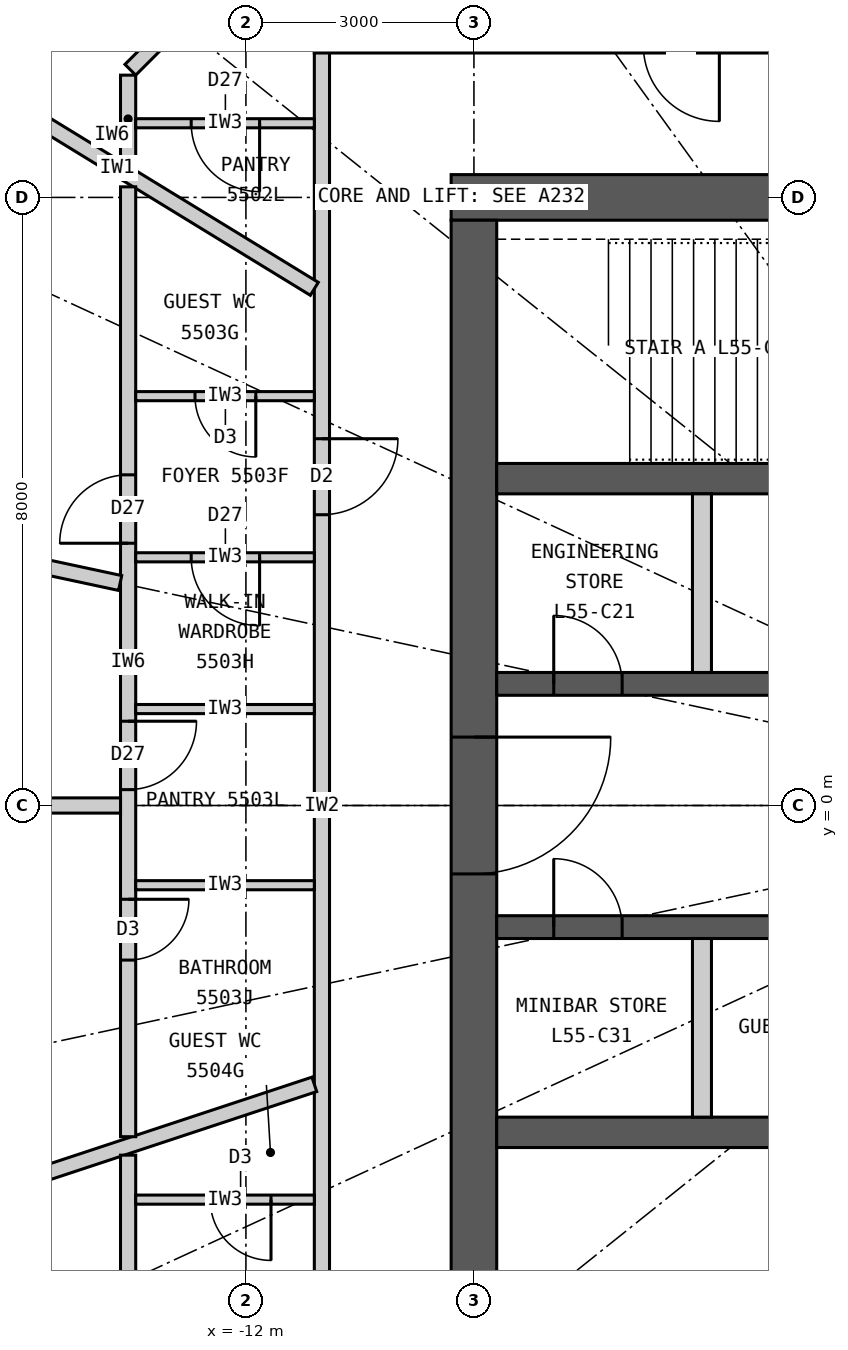
"""IFC4 building model, lengths in metres.
Left out: names, types, materials, properties, quantities, classifications, styles, units other than length and angle.
Written with IfcOpenShell. Run it as: python <this file> out.ifc"""

import sys

from ifc_helpers import new_model, si_unit, direction, frame, frame_2d, origin, place, context, subcontext, project, spatial, rectangle, extrude, element, fill, save


model = new_model("IFC4")
c1 = context("Model", 3, precision=1e-05, world=origin(), true_north=direction((0.0, 1.0)))
c2 = subcontext(c1, "Body", "Model", "MODEL_VIEW")
j1 = project(units=[si_unit("LENGTHUNIT", "METRE"), si_unit("PLANEANGLEUNIT", "RADIAN")], contexts=[c1])
p1 = place(None, origin())
s1 = spatial("IfcSite", under=j1, at=p1, CompositionType="ELEMENT")
p2 = place(p1, origin())
s2 = spatial("IfcBuilding", under=s1, at=p2, CompositionType="ELEMENT")
p3 = place(p2, frame((0.0, 0.0, 206.1)))
s3 = spatial("IfcBuildingStorey", under=s2, at=p3, CompositionType="ELEMENT", Elevation=206.1)
p4 = place(p3, frame((-9.3, 8.0, 0.0), z_axis=(0.0, 0.0, 1.0), x_axis=(1.0, 0.0, 0.0)))
e1 = element("IfcWall", 1, at=p4, inside=s3, PredefinedType="SHEAR", context=c2, shape_type="SweptSolid", body=[
    extrude(rectangle(XDim=18.6, YDim=0.6, at=frame_2d((9.3, 0.0))), origin(), (0.0, 0.0, 1.0), 3.3),
])
p5 = place(p4, frame((8.0, 0.0, 0.0)))
e2 = element("IfcOpeningElement", 2, at=p5, cuts=e1, PredefinedType="OPENING", context=c2, shape_type="SweptSolid", body=[
    extrude(rectangle(XDim=1.2, YDim=2.2, at=frame_2d((0.6, 1.1))), frame((0.0, 0.31, 0.0), z_axis=(0.0, -1.0, 0.0), x_axis=(1.0, 0.0, 0.0)), (0.0, 0.0, 1.0), 0.62),
])
p6 = place(p4, frame((15.6, 0.0, 0.0)))
e3 = element("IfcOpeningElement", 3, at=p6, cuts=e1, PredefinedType="OPENING", context=c2, shape_type="SweptSolid", body=[
    extrude(rectangle(XDim=0.9, YDim=2.2, at=frame_2d((0.45, 1.1))), frame((0.0, 0.31, 0.0), z_axis=(0.0, -1.0, 0.0), x_axis=(1.0, 0.0, 0.0)), (0.0, 0.0, 1.0), 0.62),
])
p7 = place(p3, frame((-9.0, 7.7, 0.0), z_axis=(0.0, 0.0, 1.0), x_axis=(0.0, -1.0, 0.0)))
e4 = element("IfcWall", 4, at=p7, inside=s3, PredefinedType="SHEAR", context=c2, shape_type="SweptSolid", body=[
    extrude(rectangle(XDim=15.4, YDim=0.6, at=frame_2d((7.7, 0.0))), origin(), (0.0, 0.0, 1.0), 3.3),
])
p8 = place(p7, frame((6.8, 0.0, 0.0)))
e5 = element("IfcOpeningElement", 5, at=p8, cuts=e4, PredefinedType="OPENING", context=c2, shape_type="SweptSolid", body=[
    extrude(rectangle(XDim=1.8, YDim=2.2, at=frame_2d((0.9, 1.1))), frame((0.0, 0.31, 0.0), z_axis=(0.0, -1.0, 0.0), x_axis=(1.0, 0.0, 0.0)), (0.0, 0.0, 1.0), 0.62),
])
p9 = place(p3, frame((-8.7, 4.3, 0.0), z_axis=(0.0, 0.0, 1.0), x_axis=(1.0, 0.0, 0.0)))
e6 = element("IfcWall", 6, at=p9, inside=s3, PredefinedType="SHEAR", context=c2, shape_type="SweptSolid", body=[
    extrude(rectangle(XDim=17.4, YDim=0.4, at=frame_2d((8.7, 0.0))), origin(), (0.0, 0.0, 1.0), 3.3),
])
p10 = place(p3, frame((-8.7, 1.6, 0.0), z_axis=(0.0, 0.0, 1.0), x_axis=(1.0, 0.0, 0.0)))
e7 = element("IfcWall", 7, at=p10, inside=s3, PredefinedType="SHEAR", context=c2, shape_type="SweptSolid", body=[
    extrude(rectangle(XDim=17.4, YDim=0.3, at=frame_2d((8.7, 0.0))), origin(), (0.0, 0.0, 1.0), 3.3),
])
p11 = place(p10, frame((12.65, 0.0, 0.0)))
e8 = element("IfcOpeningElement", 8, at=p11, cuts=e7, PredefinedType="OPENING", context=c2, shape_type="SweptSolid", body=[
    extrude(rectangle(XDim=1.1, YDim=2.2, at=frame_2d((0.55, 1.1))), frame((0.0, 0.16, 0.0), z_axis=(0.0, -1.0, 0.0), x_axis=(1.0, 0.0, 0.0)), (0.0, 0.0, 1.0), 0.32),
])
p12 = place(p10, frame((0.75, 0.0, 0.0)))
e9 = element("IfcOpeningElement", 9, at=p12, cuts=e7, PredefinedType="OPENING", context=c2, shape_type="SweptSolid", body=[
    extrude(rectangle(XDim=0.9, YDim=2.2, at=frame_2d((0.45, 1.1))), frame((0.0, 0.16, 0.0), z_axis=(0.0, -1.0, 0.0), x_axis=(1.0, 0.0, 0.0)), (0.0, 0.0, 1.0), 0.32),
])
p13 = place(p10, frame((6.75, 0.0, 0.0)))
e10 = element("IfcOpeningElement", 10, at=p13, cuts=e7, PredefinedType="OPENING", context=c2, shape_type="SweptSolid", body=[
    extrude(rectangle(XDim=0.9, YDim=2.2, at=frame_2d((0.45, 1.1))), frame((0.0, 0.16, 0.0), z_axis=(0.0, -1.0, 0.0), x_axis=(1.0, 0.0, 0.0)), (0.0, 0.0, 1.0), 0.32),
])
p14 = place(p3, frame((-8.7, -4.3, 0.0), z_axis=(0.0, 0.0, 1.0), x_axis=(1.0, 0.0, 0.0)))
e11 = element("IfcWall", 11, at=p14, inside=s3, PredefinedType="SHEAR", context=c2, shape_type="SweptSolid", body=[
    extrude(rectangle(XDim=17.4, YDim=0.4, at=frame_2d((8.7, 0.0))), origin(), (0.0, 0.0, 1.0), 3.3),
])
p15 = place(p3, frame((-8.7, -1.6, 0.0), z_axis=(0.0, 0.0, 1.0), x_axis=(1.0, 0.0, 0.0)))
e12 = element("IfcWall", 12, at=p15, inside=s3, PredefinedType="SHEAR", context=c2, shape_type="SweptSolid", body=[
    extrude(rectangle(XDim=17.4, YDim=0.3, at=frame_2d((8.7, 0.0))), origin(), (0.0, 0.0, 1.0), 3.3),
])
p16 = place(p15, frame((9.65, 0.0, 0.0)))
e13 = element("IfcOpeningElement", 13, at=p16, cuts=e12, PredefinedType="OPENING", context=c2, shape_type="SweptSolid", body=[
    extrude(rectangle(XDim=1.1, YDim=2.2, at=frame_2d((0.55, 1.1))), frame((0.0, 0.16, 0.0), z_axis=(0.0, -1.0, 0.0), x_axis=(1.0, 0.0, 0.0)), (0.0, 0.0, 1.0), 0.32),
])
p17 = place(p15, frame((12.4, 0.0, 0.0)))
e14 = element("IfcOpeningElement", 14, at=p17, cuts=e12, PredefinedType="OPENING", context=c2, shape_type="SweptSolid", body=[
    extrude(rectangle(XDim=1.6, YDim=2.4, at=frame_2d((0.8, 1.2))), frame((0.0, 0.16, 0.0), z_axis=(0.0, -1.0, 0.0), x_axis=(1.0, 0.0, 0.0)), (0.0, 0.0, 1.0), 0.32),
])
p18 = place(p15, frame((0.75, 0.0, 0.0)))
e15 = element("IfcOpeningElement", 15, at=p18, cuts=e12, PredefinedType="OPENING", context=c2, shape_type="SweptSolid", body=[
    extrude(rectangle(XDim=0.9, YDim=2.2, at=frame_2d((0.45, 1.1))), frame((0.0, 0.16, 0.0), z_axis=(0.0, -1.0, 0.0), x_axis=(1.0, 0.0, 0.0)), (0.0, 0.0, 1.0), 0.32),
])
p19 = place(p15, frame((5.25, 0.0, 0.0)))
e16 = element("IfcOpeningElement", 16, at=p19, cuts=e12, PredefinedType="OPENING", context=c2, shape_type="SweptSolid", body=[
    extrude(rectangle(XDim=0.9, YDim=2.2, at=frame_2d((0.45, 1.1))), frame((0.0, 0.16, 0.0), z_axis=(0.0, -1.0, 0.0), x_axis=(1.0, 0.0, 0.0)), (0.0, 0.0, 1.0), 0.32),
])
for number, where, z_axis, x_axis in (
    (17, (-6.0, 1.75, 0.0), (0.0, 0.0, 1.0), (0.0, 1.0, 0.0)),
    (18, (-6.0, -4.1, 0.0), (0.0, 0.0, 1.0), (0.0, 1.0, 0.0)),
):
    element("IfcWall", number, at=place(p3, frame(where, z_axis=z_axis, x_axis=x_axis)), inside=s3, PredefinedType="PARTITIONING", context=c2, shape_type="SweptSolid", body=[
        extrude(rectangle(XDim=2.35, YDim=0.25, at=frame_2d((1.175, 0.0))), origin(), (0.0, 0.0, 1.0), 3.3),
    ])
p20 = place(p3, frame((-11.1, 10.0, 0.0), z_axis=(0.0, 0.0, 1.0), x_axis=(1.0, 0.0, 0.0)))
e19 = element("IfcWall", 19, at=p20, inside=s3, PredefinedType="PARTITIONING", context=c2, shape_type="SweptSolid", body=[
    extrude(rectangle(XDim=22.2, YDim=0.2, at=frame_2d((11.1, 0.0))), origin(), (0.0, 0.0, 1.0), 3.12),
])
p21 = place(p20, frame((20.9, 0.0, 0.0)))
e20 = element("IfcOpeningElement", 20, at=p21, cuts=e19, PredefinedType="OPENING", context=c2, shape_type="SweptSolid", body=[
    extrude(rectangle(XDim=1.0, YDim=2.2, at=frame_2d((0.5, 1.1))), frame((0.0, 0.11, 0.0), z_axis=(0.0, -1.0, 0.0), x_axis=(1.0, 0.0, 0.0)), (0.0, 0.0, 1.0), 0.22),
])
p22 = place(p20, frame((4.329, 0.0, 0.0)))
e21 = element("IfcOpeningElement", 21, at=p22, cuts=e19, PredefinedType="OPENING", context=c2, shape_type="SweptSolid", body=[
    extrude(rectangle(XDim=1.0, YDim=2.2, at=frame_2d((0.5, 1.1))), frame((0.0, 0.11, 0.0), z_axis=(0.0, -1.0, 0.0), x_axis=(1.0, 0.0, 0.0)), (0.0, 0.0, 1.0), 0.22),
])
p23 = place(p3, frame((-11.0, 9.9, 0.0), z_axis=(0.0, 0.0, 1.0), x_axis=(0.0, -1.0, 0.0)))
e22 = element("IfcWall", 22, at=p23, inside=s3, PredefinedType="PARTITIONING", context=c2, shape_type="SweptSolid", body=[
    extrude(rectangle(XDim=19.8, YDim=0.2, at=frame_2d((9.9, 0.0))), origin(), (0.0, 0.0, 1.0), 3.12),
])
p24 = place(p23, frame((5.075, 0.0, 0.0)))
e23 = element("IfcOpeningElement", 23, at=p24, cuts=e22, PredefinedType="OPENING", context=c2, shape_type="SweptSolid", body=[
    extrude(rectangle(XDim=1.0, YDim=2.2, at=frame_2d((0.5, 1.1))), frame((0.0, 0.11, 0.0), z_axis=(0.0, -1.0, 0.0), x_axis=(1.0, 0.0, 0.0)), (0.0, 0.0, 1.0), 0.22),
])
p25 = place(p23, frame((18.645, 0.0, 0.0)))
e24 = element("IfcOpeningElement", 24, at=p25, cuts=e22, PredefinedType="OPENING", context=c2, shape_type="SweptSolid", body=[
    extrude(rectangle(XDim=1.0, YDim=2.2, at=frame_2d((0.5, 1.1))), frame((0.0, 0.11, 0.0), z_axis=(0.0, -1.0, 0.0), x_axis=(1.0, 0.0, 0.0)), (0.0, 0.0, 1.0), 0.22),
])
p26 = place(p3, frame((-11.1, 6.797, 0.0), z_axis=(0.0, 0.0, 1.0), x_axis=(-0.852799818179, 0.522237943963, 0.0)))
e25 = element("IfcWall", 25, at=p26, inside=s3, PredefinedType="PARTITIONING", context=c2, shape_type="SweptSolid", body=[
    extrude(rectangle(XDim=6.077, YDim=0.2, at=frame_2d((3.039, 0.0))), origin(), (0.0, 0.0, 1.0), 3.12),
])
p27 = place(p3, frame((-11.1, -3.669, 0.0), z_axis=(0.0, 0.0, 1.0), x_axis=(-0.949476668397, -0.313837627079, 0.0)))
e26 = element("IfcWall", 26, at=p27, inside=s3, PredefinedType="PARTITIONING", context=c2, shape_type="SweptSolid", body=[
    extrude(rectangle(XDim=8.339, YDim=0.2, at=frame_2d((4.169, 0.0))), origin(), (0.0, 0.0, 1.0), 3.12),
])
p28 = place(p3, frame((-10.679, 12.521, 0.0), z_axis=(0.0, 0.0, 1.0), x_axis=(-0.707106781187, -0.707106781187, 0.0)))
e27 = element("IfcWall", 27, at=p28, inside=s3, PredefinedType="PARTITIONING", context=c2, shape_type="SweptSolid", body=[
    extrude(rectangle(XDim=4.019, YDim=0.2, at=frame_2d((2.009, 0.0))), origin(), (0.0, 0.0, 1.0), 3.12),
])
p29 = place(p3, frame((-13.55, 9.609, 0.0), z_axis=(0.0, 0.0, 1.0), x_axis=(0.0, -1.0, 0.0)))
e28 = element("IfcWall", 28, at=p29, inside=s3, PredefinedType="PARTITIONING", context=c2, shape_type="SweptSolid", body=[
    extrude(rectangle(XDim=1.153, YDim=0.2, at=frame_2d((0.576, 0.0))), origin(), (0.0, 0.0, 1.0), 3.12),
])
p30 = place(p3, frame((-11.1, 8.976, 0.0), z_axis=(0.0, 0.0, 1.0), x_axis=(-1.0, 0.0, 0.0)))
e29 = element("IfcWall", 29, at=p30, inside=s3, PredefinedType="PARTITIONING", context=c2, shape_type="SweptSolid", body=[
    extrude(rectangle(XDim=2.35, YDim=0.12, at=frame_2d((1.175, 0.0))), origin(), (0.0, 0.0, 1.0), 3.12),
])
p31 = place(p30, frame((0.72, 0.0, 0.0)))
e30 = element("IfcOpeningElement", 30, at=p31, cuts=e29, PredefinedType="OPENING", context=c2, shape_type="SweptSolid", body=[
    extrude(rectangle(XDim=0.9, YDim=2.1, at=frame_2d((0.45, 1.05))), frame((0.0, 0.07, 0.0), z_axis=(0.0, -1.0, 0.0), x_axis=(1.0, 0.0, 0.0)), (0.0, 0.0, 1.0), 0.14),
])
p32 = place(p3, frame((-13.55, 8.139, 0.0), z_axis=(0.0, 0.0, 1.0), x_axis=(0.0, -1.0, 0.0)))
e31 = element("IfcWall", 31, at=p32, inside=s3, PredefinedType="PARTITIONING", context=c2, shape_type="SweptSolid", body=[
    extrude(rectangle(XDim=12.496, YDim=0.2, at=frame_2d((6.248, 0.0))), origin(), (0.0, 0.0, 1.0), 3.12),
])
p33 = place(p32, frame((7.031, 0.0, 0.0)))
e32 = element("IfcOpeningElement", 32, at=p33, cuts=e31, PredefinedType="OPENING", context=c2, shape_type="SweptSolid", body=[
    extrude(rectangle(XDim=0.9, YDim=2.1, at=frame_2d((0.45, 1.05))), frame((0.0, 0.11, 0.0), z_axis=(0.0, -1.0, 0.0), x_axis=(1.0, 0.0, 0.0)), (0.0, 0.0, 1.0), 0.22),
])
p34 = place(p32, frame((9.373, 0.0, 0.0)))
e33 = element("IfcOpeningElement", 33, at=p34, cuts=e31, PredefinedType="OPENING", context=c2, shape_type="SweptSolid", body=[
    extrude(rectangle(XDim=0.8, YDim=2.1, at=frame_2d((0.4, 1.05))), frame((0.0, 0.11, 0.0), z_axis=(0.0, -1.0, 0.0), x_axis=(1.0, 0.0, 0.0)), (0.0, 0.0, 1.0), 0.22),
])
p35 = place(p32, frame((3.789, 0.0, 0.0)))
e34 = element("IfcOpeningElement", 34, at=p35, cuts=e31, PredefinedType="OPENING", context=c2, shape_type="SweptSolid", body=[
    extrude(rectangle(XDim=0.9, YDim=2.1, at=frame_2d((0.45, 1.05))), frame((0.0, 0.11, 0.0), z_axis=(0.0, -1.0, 0.0), x_axis=(1.0, 0.0, 0.0)), (0.0, 0.0, 1.0), 0.22),
])
p36 = place(p3, frame((-13.655, 2.927, 0.0), z_axis=(0.0, 0.0, 1.0), x_axis=(-0.977790419294, 0.209585056568, 0.0)))
e35 = element("IfcWall", 35, at=p36, inside=s3, PredefinedType="PARTITIONING", context=c2, shape_type="SweptSolid", body=[
    extrude(rectangle(XDim=5.66, YDim=0.2, at=frame_2d((2.83, 0.0))), origin(), (0.0, 0.0, 1.0), 2.42),
])
p37 = place(p36, frame((1.82, 0.0, 0.0)))
e36 = element("IfcOpeningElement", 36, at=p37, cuts=e35, PredefinedType="OPENING", context=c2, shape_type="SweptSolid", body=[
    extrude(rectangle(XDim=0.9, YDim=2.1, at=frame_2d((0.45, 1.05))), frame((0.0, 0.11, 0.0), z_axis=(0.0, -1.0, 0.0), x_axis=(1.0, 0.0, 0.0)), (0.0, 0.0, 1.0), 0.22),
])
p38 = place(p3, frame((-13.65, 0.0, 0.0), z_axis=(0.0, 0.0, 1.0), x_axis=(-1.0, 0.0, 0.0)))
e37 = element("IfcWall", 37, at=p38, inside=s3, PredefinedType="PARTITIONING", context=c2, shape_type="SweptSolid", body=[
    extrude(rectangle(XDim=6.25, YDim=0.2, at=frame_2d((3.125, 0.0))), origin(), (0.0, 0.0, 1.0), 2.37),
])
p39 = place(p38, frame((2.07, 0.0, 0.0)))
e38 = element("IfcOpeningElement", 38, at=p39, cuts=e37, PredefinedType="OPENING", context=c2, shape_type="SweptSolid", body=[
    extrude(rectangle(XDim=0.9, YDim=2.1, at=frame_2d((0.45, 1.05))), frame((0.0, 0.11, 0.0), z_axis=(0.0, -1.0, 0.0), x_axis=(1.0, 0.0, 0.0)), (0.0, 0.0, 1.0), 0.22),
])
p40 = place(p3, frame((-11.1, 5.385, 0.0), z_axis=(0.0, 0.0, 1.0), x_axis=(-1.0, 0.0, 0.0)))
e39 = element("IfcWall", 39, at=p40, inside=s3, PredefinedType="PARTITIONING", context=c2, shape_type="SweptSolid", body=[
    extrude(rectangle(XDim=2.35, YDim=0.12, at=frame_2d((1.175, 0.0))), origin(), (0.0, 0.0, 1.0), 3.12),
])
p41 = place(p40, frame((0.77, 0.0, 0.0)))
e40 = element("IfcOpeningElement", 40, at=p41, cuts=e39, PredefinedType="OPENING", context=c2, shape_type="SweptSolid", body=[
    extrude(rectangle(XDim=0.8, YDim=2.1, at=frame_2d((0.4, 1.05))), frame((0.0, 0.07, 0.0), z_axis=(0.0, -1.0, 0.0), x_axis=(1.0, 0.0, 0.0)), (0.0, 0.0, 1.0), 0.14),
])
p42 = place(p3, frame((-11.1, 3.265, 0.0), z_axis=(0.0, 0.0, 1.0), x_axis=(-1.0, 0.0, 0.0)))
e41 = element("IfcWall", 41, at=p42, inside=s3, PredefinedType="PARTITIONING", context=c2, shape_type="SweptSolid", body=[
    extrude(rectangle(XDim=2.35, YDim=0.12, at=frame_2d((1.175, 0.0))), origin(), (0.0, 0.0, 1.0), 2.42),
])
p43 = place(p42, frame((0.72, 0.0, 0.0)))
e42 = element("IfcOpeningElement", 42, at=p43, cuts=e41, PredefinedType="OPENING", context=c2, shape_type="SweptSolid", body=[
    extrude(rectangle(XDim=0.9, YDim=2.1, at=frame_2d((0.45, 1.05))), frame((0.0, 0.07, 0.0), z_axis=(0.0, -1.0, 0.0), x_axis=(1.0, 0.0, 0.0)), (0.0, 0.0, 1.0), 0.14),
])
for number, where, z_axis, x_axis in (
    (43, (-11.1, 1.269, 0.0), (0.0, 0.0, 1.0), (-1.0, 0.0, 0.0)),
    (44, (-11.1, -1.049, 0.0), (0.0, 0.0, 1.0), (-1.0, 0.0, 0.0)),
):
    element("IfcWall", number, at=place(p3, frame(where, z_axis=z_axis, x_axis=x_axis)), inside=s3, PredefinedType="PARTITIONING", context=c2, shape_type="SweptSolid", body=[
        extrude(rectangle(XDim=2.35, YDim=0.12, at=frame_2d((1.175, 0.0))), origin(), (0.0, 0.0, 1.0), 3.12),
    ])
p44 = place(p3, frame((-13.55, -4.6, 0.0), z_axis=(0.0, 0.0, 1.0), x_axis=(0.0, -1.0, 0.0)))
e45 = element("IfcWall", 45, at=p44, inside=s3, PredefinedType="PARTITIONING", context=c2, shape_type="SweptSolid", body=[
    extrude(rectangle(XDim=5.009, YDim=0.2, at=frame_2d((2.504, 0.0))), origin(), (0.0, 0.0, 1.0), 3.12),
])
p45 = place(p44, frame((2.07, 0.0, 0.0)))
e46 = element("IfcOpeningElement", 46, at=p45, cuts=e45, PredefinedType="OPENING", context=c2, shape_type="SweptSolid", body=[
    extrude(rectangle(XDim=0.9, YDim=2.1, at=frame_2d((0.45, 1.05))), frame((0.0, 0.11, 0.0), z_axis=(0.0, -1.0, 0.0), x_axis=(1.0, 0.0, 0.0)), (0.0, 0.0, 1.0), 0.22),
])
p46 = place(p3, frame((-11.1, -5.185, 0.0), z_axis=(0.0, 0.0, 1.0), x_axis=(-1.0, 0.0, 0.0)))
e47 = element("IfcWall", 47, at=p46, inside=s3, PredefinedType="PARTITIONING", context=c2, shape_type="SweptSolid", body=[
    extrude(rectangle(XDim=2.35, YDim=0.12, at=frame_2d((1.175, 0.0))), origin(), (0.0, 0.0, 1.0), 3.12),
])
p47 = place(p46, frame((0.57, 0.0, 0.0)))
e48 = element("IfcOpeningElement", 48, at=p47, cuts=e47, PredefinedType="OPENING", context=c2, shape_type="SweptSolid", body=[
    extrude(rectangle(XDim=0.8, YDim=2.1, at=frame_2d((0.4, 1.05))), frame((0.0, 0.07, 0.0), z_axis=(0.0, -1.0, 0.0), x_axis=(1.0, 0.0, 0.0)), (0.0, 0.0, 1.0), 0.14),
])
p48 = place(p31, origin())
e49 = element("IfcDoor", 49, at=p48, inside=s3, OperationType="SINGLE_SWING_LEFT", PredefinedType="DOOR", context=c2, shape_type="SweptSolid", body=[
    extrude(rectangle(XDim=0.9, YDim=2.1, at=frame_2d((0.45, 1.05))), frame((0.0, 0.025, 0.0), z_axis=(0.0, -1.0, 0.0), x_axis=(1.0, 0.0, 0.0)), (0.0, 0.0, 1.0), 0.05),
])
fill(e30, e49)
p49 = place(p24, origin())
e50 = element("IfcDoor", 50, at=p49, inside=s3, OperationType="SINGLE_SWING_LEFT", PredefinedType="DOOR", context=c2, shape_type="SweptSolid", body=[
    extrude(rectangle(XDim=1.0, YDim=2.2, at=frame_2d((0.5, 1.1))), frame((0.0, 0.025, 0.0), z_axis=(0.0, -1.0, 0.0), x_axis=(1.0, 0.0, 0.0)), (0.0, 0.0, 1.0), 0.05),
])
fill(e23, e50)
p50 = place(p41, origin())
e51 = element("IfcDoor", 51, at=p50, inside=s3, OperationType="SINGLE_SWING_LEFT", PredefinedType="DOOR", context=c2, shape_type="SweptSolid", body=[
    extrude(rectangle(XDim=0.8, YDim=2.1, at=frame_2d((0.4, 1.05))), frame((0.0, 0.025, 0.0), z_axis=(0.0, -1.0, 0.0), x_axis=(1.0, 0.0, 0.0)), (0.0, 0.0, 1.0), 0.05),
])
fill(e40, e51)
p51 = place(p43, origin())
e52 = element("IfcDoor", 52, at=p51, inside=s3, OperationType="SINGLE_SWING_LEFT", PredefinedType="DOOR", context=c2, shape_type="SweptSolid", body=[
    extrude(rectangle(XDim=0.9, YDim=2.1, at=frame_2d((0.45, 1.05))), frame((0.0, 0.025, 0.0), z_axis=(0.0, -1.0, 0.0), x_axis=(1.0, 0.0, 0.0)), (0.0, 0.0, 1.0), 0.05),
])
fill(e42, e52)
p52 = place(p33, origin())
e53 = element("IfcDoor", 53, at=p52, inside=s3, OperationType="SINGLE_SWING_LEFT", PredefinedType="DOOR", context=c2, shape_type="SweptSolid", body=[
    extrude(rectangle(XDim=0.9, YDim=2.1, at=frame_2d((0.45, 1.05))), frame((0.0, 0.025, 0.0), z_axis=(0.0, -1.0, 0.0), x_axis=(1.0, 0.0, 0.0)), (0.0, 0.0, 1.0), 0.05),
])
fill(e32, e53)
p53 = place(p34, origin())
e54 = element("IfcDoor", 54, at=p53, inside=s3, OperationType="SINGLE_SWING_LEFT", PredefinedType="DOOR", context=c2, shape_type="SweptSolid", body=[
    extrude(rectangle(XDim=0.8, YDim=2.1, at=frame_2d((0.4, 1.05))), frame((0.0, 0.025, 0.0), z_axis=(0.0, -1.0, 0.0), x_axis=(1.0, 0.0, 0.0)), (0.0, 0.0, 1.0), 0.05),
])
fill(e33, e54)
p54 = place(p35, origin())
e55 = element("IfcDoor", 55, at=p54, inside=s3, OperationType="SINGLE_SWING_RIGHT", PredefinedType="DOOR", context=c2, shape_type="SweptSolid", body=[
    extrude(rectangle(XDim=0.9, YDim=2.1, at=frame_2d((0.45, 1.05))), frame((0.0, 0.025, 0.0), z_axis=(0.0, -1.0, 0.0), x_axis=(1.0, 0.0, 0.0)), (0.0, 0.0, 1.0), 0.05),
])
fill(e34, e55)
p55 = place(p47, origin())
e56 = element("IfcDoor", 56, at=p55, inside=s3, OperationType="SINGLE_SWING_LEFT", PredefinedType="DOOR", context=c2, shape_type="SweptSolid", body=[
    extrude(rectangle(XDim=0.8, YDim=2.1, at=frame_2d((0.4, 1.05))), frame((0.0, 0.025, 0.0), z_axis=(0.0, -1.0, 0.0), x_axis=(1.0, 0.0, 0.0)), (0.0, 0.0, 1.0), 0.05),
])
fill(e48, e56)
p56 = place(p12, origin())
e57 = element("IfcDoor", 57, at=p56, inside=s3, OperationType="SINGLE_SWING_LEFT", PredefinedType="DOOR", context=c2, shape_type="SweptSolid", body=[
    extrude(rectangle(XDim=0.9, YDim=2.2, at=frame_2d((0.45, 1.1))), frame((0.0, 0.025, 0.0), z_axis=(0.0, -1.0, 0.0), x_axis=(1.0, 0.0, 0.0)), (0.0, 0.0, 1.0), 0.05),
])
fill(e9, e57)
p57 = place(p18, origin())
e58 = element("IfcDoor", 58, at=p57, inside=s3, OperationType="SINGLE_SWING_LEFT", PredefinedType="DOOR", context=c2, shape_type="SweptSolid", body=[
    extrude(rectangle(XDim=0.9, YDim=2.2, at=frame_2d((0.45, 1.1))), frame((0.0, 0.025, 0.0), z_axis=(0.0, -1.0, 0.0), x_axis=(1.0, 0.0, 0.0)), (0.0, 0.0, 1.0), 0.05),
])
fill(e15, e58)
p58 = place(p8, origin())
e59 = element("IfcDoor", 59, at=p58, inside=s3, OperationType="DOUBLE_DOOR_DOUBLE_SWING", PredefinedType="DOOR", context=c2, shape_type="SweptSolid", body=[
    extrude(rectangle(XDim=1.8, YDim=2.2, at=frame_2d((0.9, 1.1))), frame((0.0, 0.025, 0.0), z_axis=(0.0, -1.0, 0.0), x_axis=(1.0, 0.0, 0.0)), (0.0, 0.0, 1.0), 0.05),
])
fill(e5, e59)
save(model, sys.argv[1])
